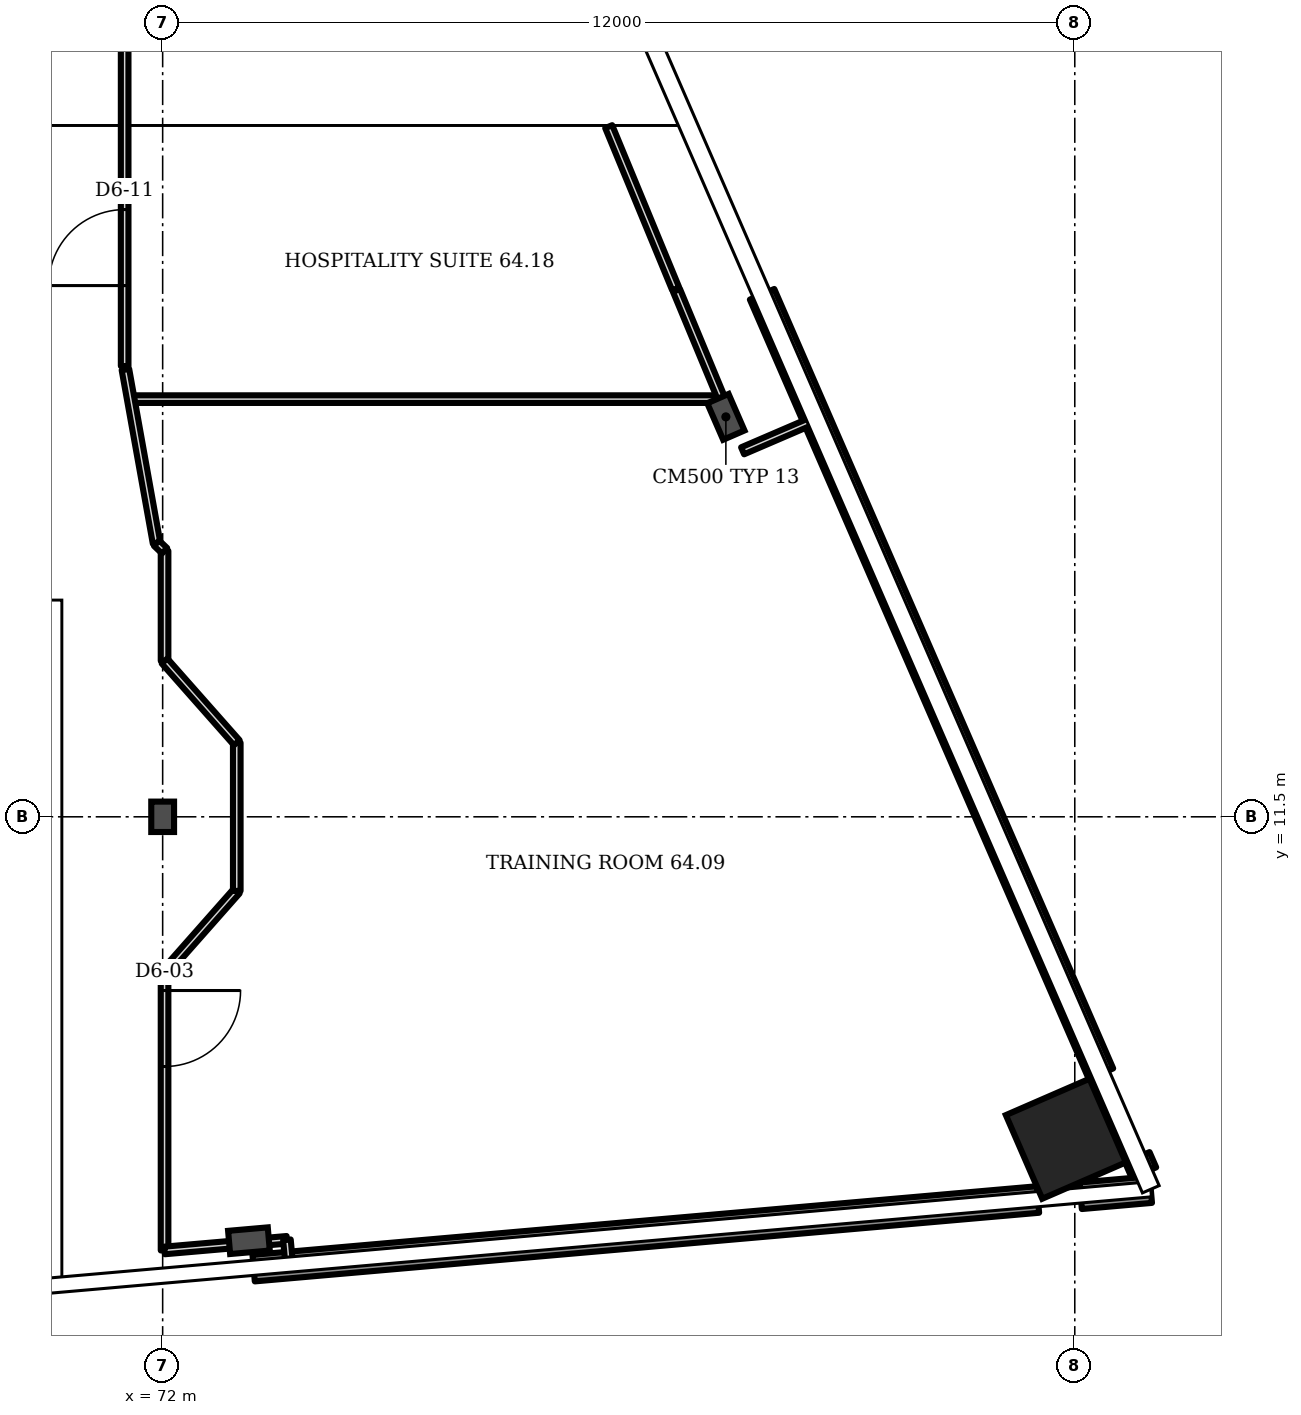
"""IFC4 building model, lengths in metres.
Left out: names, types, materials, properties, quantities, classifications, styles, units other than length and angle.
Written with IfcOpenShell. Run it as: python <this file> out.ifc"""

import sys

from ifc_helpers import new_model, si_unit, direction, frame, frame_2d, origin, origin_2d, place, context, subcontext, project, spatial, rectangle, i_section, extrude, element, fill, save


model = new_model("IFC4")
c1 = context("Model", 3, precision=1e-05, world=origin(), true_north=direction((0.0, 1.0)))
c2 = subcontext(c1, "Body", "Model", "MODEL_VIEW")
j1 = project(units=[si_unit("LENGTHUNIT", "METRE"), si_unit("PLANEANGLEUNIT", "RADIAN")], contexts=[c1])
p1 = place(None, origin())
s1 = spatial("IfcSite", under=j1, at=p1, CompositionType="ELEMENT")
p2 = place(p1, origin())
s2 = spatial("IfcBuilding", under=s1, at=p2, CompositionType="ELEMENT")
p3 = place(p2, frame((0.0, 0.0, 253.9)))
s3 = spatial("IfcBuildingStorey", under=s2, at=p3, CompositionType="ELEMENT", Elevation=253.9)
p4 = place(p3, frame((83.883, 7.265, 0.0), z_axis=(0.0, 0.0, 1.0), x_axis=(-0.398727, 0.917072, 0.0)))
e1 = element("IfcColumn", 1, at=p4, inside=s3, PredefinedType="COLUMN", context=c2, shape_type="SweptSolid", body=[
    extrude(rectangle(XDim=1.2, YDim=1.2, at=origin_2d()), origin(), (0.0, 0.0, 1.0), 3.6),
])
for number, where, z_axis, x_axis in (
    (2, (73.135, 5.923, 0.0), (0.0, 0.0, 1.0), (0.087, -0.996, 0.0)),
    (3, (79.41, 16.762, 0.0), (0.0, 0.0, 1.0), (0.917, 0.399, 0.0)),
):
    element("IfcColumn", number, at=place(p3, frame(where, z_axis=z_axis, x_axis=x_axis)), inside=s3, PredefinedType="COLUMN", context=c2, shape_type="SweptSolid", body=[
        extrude(i_section(OverallWidth=0.306, OverallDepth=0.524, WebThickness=0.021, FlangeThickness=0.04, FilletRadius=0.027, at=origin_2d()), origin(), (0.0, 0.0, 1.0), 3.6),
    ])
p5 = place(p3, frame((72.0, 11.5, 0.0), z_axis=(0.0, 0.0, 1.0), x_axis=(1.0, 0.0, 0.0)))
e4 = element("IfcColumn", 4, at=p5, inside=s3, PredefinedType="COLUMN", context=c2, shape_type="SweptSolid", body=[
    extrude(i_section(OverallWidth=0.3, OverallDepth=0.4, WebThickness=0.013, FlangeThickness=0.024, FilletRadius=0.027, at=origin_2d()), origin(), (0.0, 0.0, 1.0), 3.6),
])
p6 = place(p3, frame((73.197, 5.562, 0.0), z_axis=(0.0, 0.0, 1.0), x_axis=(0.996198, 0.087163, 0.0)))
e5 = element("IfcWall", 5, at=p6, inside=s3, PredefinedType="SOLIDWALL", context=c2, shape_type="SweptSolid", body=[
    extrude(rectangle(XDim=10.358, YDim=0.35, at=frame_2d((5.179, 0.0))), origin(), (0.0, 0.0, 1.0), 1.0),
])
p7 = place(p3, frame((84.078, 6.514, 0.0), z_axis=(0.0, 0.0, 1.0), x_axis=(0.996213, 0.086971, 0.0)))
e6 = element("IfcWall", 6, at=p7, inside=s3, PredefinedType="SOLIDWALL", context=c2, shape_type="SweptSolid", body=[
    extrude(rectangle(XDim=0.926, YDim=0.35, at=frame_2d((0.463, 0.0))), origin(), (0.0, 0.0, 1.0), 1.0),
])
p8 = place(p3, frame((84.91, 6.819, 0.0), z_axis=(0.0, 0.0, 1.0), x_axis=(-0.398359, 0.91723, 0.0)))
e7 = element("IfcWall", 7, at=p8, inside=s3, PredefinedType="SOLIDWALL", context=c2, shape_type="SweptSolid", body=[
    extrude(rectangle(XDim=0.219, YDim=0.35, at=frame_2d((0.109, 0.0))), origin(), (0.0, 0.0, 1.0), 1.0),
])
p9 = place(p3, frame((84.345, 8.12, 0.0), z_axis=(0.0, 0.0, 1.0), x_axis=(-0.398721, 0.917067, 0.0)))
e8 = element("IfcWall", 8, at=p9, inside=s3, PredefinedType="SOLIDWALL", context=c2, shape_type="SweptSolid", body=[
    extrude(rectangle(XDim=11.182, YDim=0.35, at=frame_2d((5.591, 0.0))), origin(), (0.0, 0.0, 1.0), 1.0),
])
p10 = place(p3, frame((71.5, 17.43, 0.0), z_axis=(0.0, 0.0, 1.0), x_axis=(0.0, 1.0, 0.0)))
e9 = element("IfcWall", 9, at=p10, inside=s3, PredefinedType="PARTITIONING", context=c2, shape_type="SweptSolid", body=[
    extrude(rectangle(XDim=4.345, YDim=0.1, at=frame_2d((2.172, 0.0))), origin(), (0.0, 0.0, 1.0), 3.2),
])
p11 = place(p10, frame((1.059, 0.0, 0.0)))
e10 = element("IfcOpeningElement", 10, at=p11, cuts=e9, PredefinedType="OPENING", context=c2, shape_type="SweptSolid", body=[
    extrude(rectangle(XDim=1.0, YDim=2.1, at=frame_2d((0.5, 1.05))), frame((0.0, 0.06, 0.0), z_axis=(0.0, -1.0, 0.0), x_axis=(1.0, 0.0, 0.0)), (0.0, 0.0, 1.0), 0.12),
])
p12 = place(p3, frame((71.58, 16.995, 0.0), z_axis=(0.0, 0.0, 1.0), x_axis=(1.0, 0.0, 0.0)))
e11 = element("IfcWall", 11, at=p12, inside=s3, PredefinedType="PARTITIONING", context=c2, shape_type="SweptSolid", body=[
    extrude(rectangle(XDim=7.765, YDim=0.1, at=frame_2d((3.882, 0.0))), origin(), (0.0, 0.0, 1.0), 3.2),
])
p13 = place(p3, frame((71.92, 15.1, 0.0), z_axis=(0.0, 0.0, 1.0), x_axis=(-0.176581, 0.984289, 0.0)))
e12 = element("IfcWall", 12, at=p13, inside=s3, PredefinedType="PARTITIONING", context=c2, shape_type="SweptSolid", body=[
    extrude(rectangle(XDim=2.321, YDim=0.1, at=frame_2d((1.161, 0.0))), origin(), (0.0, 0.0, 1.0), 3.2),
])
p14 = place(p3, frame((72.025, 5.795, 0.0), z_axis=(0.0, 0.0, 1.0), x_axis=(0.0, 1.0, 0.0)))
e13 = element("IfcWall", 13, at=p14, inside=s3, PredefinedType="PARTITIONING", context=c2, shape_type="SweptSolid", body=[
    extrude(rectangle(XDim=3.655, YDim=0.1, at=frame_2d((1.828, 0.0))), origin(), (0.0, 0.0, 1.0), 3.2),
])
p15 = place(p14, frame((2.42, 0.0, 0.0)))
e14 = element("IfcOpeningElement", 14, at=p15, cuts=e13, PredefinedType="OPENING", context=c2, shape_type="SweptSolid", body=[
    extrude(rectangle(XDim=1.0, YDim=2.1, at=frame_2d((0.5, 1.05))), frame((0.0, 0.06, 0.0), z_axis=(0.0, -1.0, 0.0), x_axis=(1.0, 0.0, 0.0)), (0.0, 0.0, 1.0), 0.12),
])
p16 = place(p3, frame((72.025, 13.55, 0.0), z_axis=(0.0, 0.0, 1.0), x_axis=(0.0, 1.0, 0.0)))
e15 = element("IfcWall", 15, at=p16, inside=s3, PredefinedType="PARTITIONING", context=c2, shape_type="SweptSolid", body=[
    extrude(rectangle(XDim=1.45, YDim=0.1, at=frame_2d((0.725, 0.0))), origin(), (0.0, 0.0, 1.0), 3.2),
])
p17 = place(p3, frame((72.025, 15.0, 0.0), z_axis=(0.0, 0.0, 1.0), x_axis=(-0.723734, 0.690072, 0.0)))
e16 = element("IfcWall", 16, at=p17, inside=s3, PredefinedType="PARTITIONING", context=c2, shape_type="SweptSolid", body=[
    extrude(rectangle(XDim=0.145, YDim=0.1, at=frame_2d((0.073, 0.0))), origin(), (0.0, 0.0, 1.0), 3.2),
])
p18 = place(p3, frame((72.025, 5.795, 0.0), z_axis=(0.0, 0.0, 1.0), x_axis=(0.996236, 0.086708, 0.0)))
e17 = element("IfcWall", 17, at=p18, inside=s3, PredefinedType="PARTITIONING", context=c2, shape_type="SweptSolid", body=[
    extrude(rectangle(XDim=1.616, YDim=0.1, at=frame_2d((0.808, 0.0))), origin(), (0.0, 0.0, 1.0), 2.58),
])
p19 = place(p3, frame((72.025, 9.45, 0.0), z_axis=(0.0, 0.0, 1.0), x_axis=(0.662295, 0.749251, 0.0)))
e18 = element("IfcWall", 18, at=p19, inside=s3, PredefinedType="PARTITIONING", context=c2, shape_type="SweptSolid", body=[
    extrude(rectangle(XDim=1.435, YDim=0.1, at=frame_2d((0.717, 0.0))), origin(), (0.0, 0.0, 1.0), 3.2),
])
p20 = place(p3, frame((72.975, 10.525, 0.0), z_axis=(0.0, 0.0, 1.0), x_axis=(0.0, 1.0, 0.0)))
e19 = element("IfcWall", 19, at=p20, inside=s3, PredefinedType="PARTITIONING", context=c2, shape_type="SweptSolid", body=[
    extrude(rectangle(XDim=1.95, YDim=0.1, at=frame_2d((0.975, 0.0))), origin(), (0.0, 0.0, 1.0), 3.2),
])
p21 = place(p3, frame((72.975, 12.475, 0.0), z_axis=(0.0, 0.0, 1.0), x_axis=(-0.662295, 0.749251, 0.0)))
e20 = element("IfcWall", 20, at=p21, inside=s3, PredefinedType="PARTITIONING", context=c2, shape_type="SweptSolid", body=[
    extrude(rectangle(XDim=1.435, YDim=0.1, at=frame_2d((0.717, 0.0))), origin(), (0.0, 0.0, 1.0), 3.2),
])
p22 = place(p3, frame((73.663, 5.628, 0.0), z_axis=(0.0, 0.0, 1.0), x_axis=(-0.091893, 0.995772, 0.0)))
e21 = element("IfcWall", 21, at=p22, inside=s3, PredefinedType="PARTITIONING", context=c2, shape_type="SweptSolid", body=[
    extrude(rectangle(XDim=0.308, YDim=0.1, at=frame_2d((0.154, 0.0))), origin(), (0.0, 0.0, 1.0), 3.2),
])
p23 = place(p3, frame((78.75, 18.445, 0.0), z_axis=(0.0, 0.0, 1.0), x_axis=(-0.381663, 0.924299, 0.0)))
e22 = element("IfcWall", 22, at=p23, inside=s3, PredefinedType="PARTITIONING", context=c2, shape_type="SweptSolid", body=[
    extrude(rectangle(XDim=2.31, YDim=0.1, at=frame_2d((1.155, 0.0))), origin(), (0.0, 0.0, 1.0), 3.2),
])
p24 = place(p3, frame((79.35, 17.005, 0.0), z_axis=(0.0, 0.0, 1.0), x_axis=(-0.383703, 0.923459, 0.0)))
e23 = element("IfcWall", 23, at=p24, inside=s3, PredefinedType="PARTITIONING", context=c2, shape_type="SweptSolid", body=[
    extrude(rectangle(XDim=1.538, YDim=0.1, at=frame_2d((0.769, 0.0))), origin(), (0.0, 0.0, 1.0), 3.2),
])
p25 = place(p3, frame((79.63, 16.315, 0.0), z_axis=(0.0, 0.0, 1.0), x_axis=(0.918616, 0.395147, 0.0)))
e24 = element("IfcWall", 24, at=p25, inside=s3, PredefinedType="PARTITIONING", context=c2, shape_type="SweptSolid", body=[
    extrude(rectangle(XDim=1.031, YDim=0.1, at=frame_2d((0.516, 0.0))), origin(), (0.0, 0.0, 1.0), 2.58),
])
p26 = place(p15, origin())
e25 = element("IfcDoor", 25, at=p26, inside=s3, OperationType="SINGLE_SWING_RIGHT", PredefinedType="DOOR", context=c2, shape_type="SweptSolid", body=[
    extrude(rectangle(XDim=1.0, YDim=2.1, at=frame_2d((0.5, 1.05))), frame((0.0, 0.025, 0.0), z_axis=(0.0, -1.0, 0.0), x_axis=(1.0, 0.0, 0.0)), (0.0, 0.0, 1.0), 0.05),
])
fill(e14, e25)
p27 = place(p11, origin())
e26 = element("IfcDoor", 26, at=p27, inside=s3, OperationType="SINGLE_SWING_LEFT", PredefinedType="DOOR", context=c2, shape_type="SweptSolid", body=[
    extrude(rectangle(XDim=1.0, YDim=2.1, at=frame_2d((0.5, 1.05))), frame((0.0, 0.025, 0.0), z_axis=(0.0, -1.0, 0.0), x_axis=(1.0, 0.0, 0.0)), (0.0, 0.0, 1.0), 0.05),
])
fill(e10, e26)
save(model, sys.argv[1])
